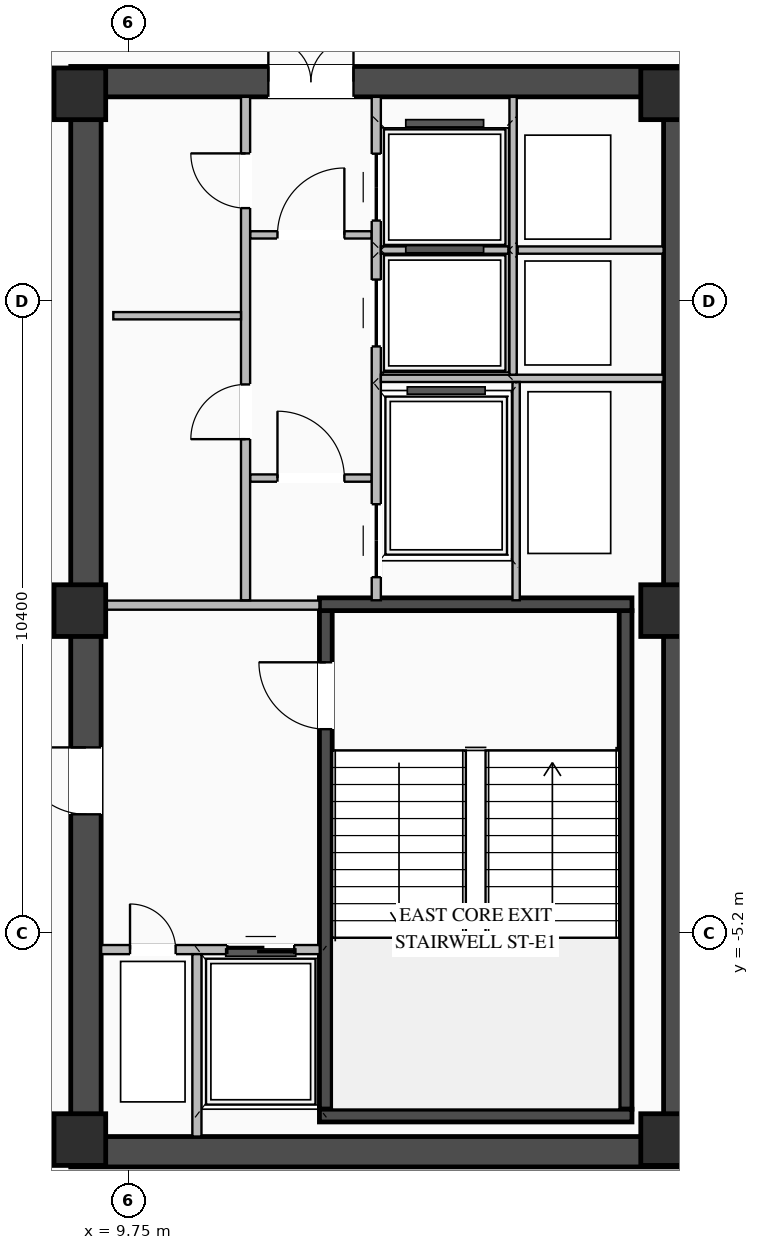
"""IFC4 building model, lengths in metres.
Left out: names, types, materials, properties, quantities, classifications, styles, units other than length and angle.
Written with IfcOpenShell. Run it as: python <this file> out.ifc"""

import sys

from ifc_helpers import new_model, si_unit, direction, frame, frame_2d, origin, origin_2d, place, context, subcontext, project, spatial, rectangle, extrude, element, fill, save


model = new_model("IFC4")
c1 = context("Model", 3, precision=1e-05, world=origin(), true_north=direction((0.0, 1.0)))
c2 = subcontext(c1, "Body", "Model", "MODEL_VIEW")
j1 = project(units=[si_unit("LENGTHUNIT", "METRE"), si_unit("PLANEANGLEUNIT", "RADIAN")], contexts=[c1])
p1 = place(None, origin())
s1 = spatial("IfcSite", under=j1, at=p1, CompositionType="ELEMENT")
p2 = place(p1, origin())
s2 = spatial("IfcBuilding", under=s1, at=p2, CompositionType="ELEMENT")
p3 = place(p2, frame((0.0, 0.0, 247.5)))
s3 = spatial("IfcBuildingStorey", under=s2, at=p3, CompositionType="ELEMENT", Elevation=247.5)
p4 = place(p3, frame((8.8, -8.8, 0.0), z_axis=(0.0, 0.0, 1.0), x_axis=(1.0, 0.0, 0.0)))
e1 = element("IfcWall", 1, at=p4, inside=s3, PredefinedType="SHEAR", context=c2, shape_type="SweptSolid", body=[
    extrude(rectangle(XDim=10.25, YDim=0.5, at=frame_2d((5.125, 0.0))), origin(), (0.0, 0.0, 1.0), 4.02),
])
p5 = place(p3, frame((8.8, 8.8, 0.0), z_axis=(0.0, 0.0, 1.0), x_axis=(1.0, 0.0, 0.0)))
e2 = element("IfcWall", 2, at=p5, inside=s3, PredefinedType="SHEAR", context=c2, shape_type="SweptSolid", body=[
    extrude(rectangle(XDim=10.25, YDim=0.5, at=frame_2d((5.125, 0.0))), origin(), (0.0, 0.0, 1.0), 4.02),
])
p6 = place(p5, frame((3.25, 0.0, 0.0)))
e3 = element("IfcOpeningElement", 3, at=p6, cuts=e2, PredefinedType="OPENING", context=c2, shape_type="SweptSolid", body=[
    extrude(rectangle(XDim=1.4, YDim=2.05, at=frame_2d((0.7, 1.025))), frame((0.0, 0.26, 0.0), z_axis=(0.0, -1.0, 0.0), x_axis=(1.0, 0.0, 0.0)), (0.0, 0.0, 1.0), 0.52),
])
p7 = place(p3, frame((9.05, -8.55, 0.0), z_axis=(0.0, 0.0, 1.0), x_axis=(0.0, 1.0, 0.0)))
e4 = element("IfcWall", 4, at=p7, inside=s3, PredefinedType="SHEAR", context=c2, shape_type="SweptSolid", body=[
    extrude(rectangle(XDim=17.1, YDim=0.5, at=frame_2d((8.55, 0.0))), origin(), (0.0, 0.0, 1.0), 4.02),
])
p8 = place(p7, frame((5.3, 0.0, 0.0)))
e5 = element("IfcOpeningElement", 5, at=p8, cuts=e4, PredefinedType="OPENING", context=c2, shape_type="SweptSolid", body=[
    extrude(rectangle(XDim=1.1, YDim=2.08, at=frame_2d((0.55, 1.04))), frame((0.0, 0.26, 0.0), z_axis=(0.0, -1.0, 0.0), x_axis=(1.0, 0.0, 0.0)), (0.0, 0.0, 1.0), 0.52),
])
p9 = place(p3, frame((18.8, -8.55, 0.0), z_axis=(0.0, 0.0, 1.0), x_axis=(0.0, 1.0, 0.0)))
e6 = element("IfcWall", 6, at=p9, inside=s3, PredefinedType="SHEAR", context=c2, shape_type="SweptSolid", body=[
    extrude(rectangle(XDim=17.1, YDim=0.5, at=frame_2d((8.55, 0.0))), origin(), (0.0, 0.0, 1.0), 4.02),
])
p10 = place(p3, frame((12.995, -8.1, 0.0), z_axis=(0.0, 0.0, 1.0), x_axis=(0.0, 1.0, 0.0)))
e7 = element("IfcWall", 7, at=p10, inside=s3, PredefinedType="SHEAR", context=c2, shape_type="SweptSolid", body=[
    extrude(rectangle(XDim=8.2, YDim=0.21, at=frame_2d((4.1, 0.0))), origin(), (0.0, 0.0, 1.0), 4.02),
])
p11 = place(p10, frame((6.25, 0.0, 0.0)))
e8 = element("IfcOpeningElement", 8, at=p11, cuts=e7, PredefinedType="OPENING", context=c2, shape_type="SweptSolid", body=[
    extrude(rectangle(XDim=1.1, YDim=2.15, at=frame_2d((0.55, 1.075))), frame((0.0, 0.115, 0.0), z_axis=(0.0, -1.0, 0.0), x_axis=(1.0, 0.0, 0.0)), (0.0, 0.0, 1.0), 0.23),
])
p12 = place(p3, frame((17.925, -8.1, 0.0), z_axis=(0.0, 0.0, 1.0), x_axis=(0.0, 1.0, 0.0)))
e9 = element("IfcWall", 9, at=p12, inside=s3, PredefinedType="SHEAR", context=c2, shape_type="SweptSolid", body=[
    extrude(rectangle(XDim=8.2, YDim=0.21, at=frame_2d((4.1, 0.0))), origin(), (0.0, 0.0, 1.0), 4.02),
])
for number, where, z_axis, x_axis in (
    (10, (12.89, -8.205, 0.0), (0.0, 0.0, 1.0), (1.0, 0.0, 0.0)),
    (11, (18.03, 0.205, 0.0), (0.0, 0.0, 1.0), (-1.0, 0.0, 0.0)),
):
    element("IfcWall", number, at=place(p3, frame(where, z_axis=z_axis, x_axis=x_axis)), inside=s3, PredefinedType="SHEAR", context=c2, shape_type="SweptSolid", body=[
        extrude(rectangle(XDim=5.14, YDim=0.21, at=frame_2d((2.57, 0.0))), origin(), (0.0, 0.0, 1.0), 4.02),
    ])
for number, where, z_axis, x_axis in (
    (12, (8.95, -8.6, 0.0), (0.0, 0.0, 1.0), (1.0, 0.0, 0.0)),
    (13, (8.95, 0.1, 0.0), (0.0, 0.0, 1.0), (1.0, 0.0, 0.0)),
    (14, (8.95, 8.6, 0.0), (0.0, 0.0, 1.0), (1.0, 0.0, 0.0)),
    (15, (18.6, -8.6, 0.0), (0.0, 0.0, 1.0), (1.0, 0.0, 0.0)),
    (16, (18.6, 0.1, 0.0), (0.0, 0.0, 1.0), (1.0, 0.0, 0.0)),
    (17, (18.6, 8.6, 0.0), (0.0, 0.0, 1.0), (1.0, 0.0, 0.0)),
):
    element("IfcColumn", number, at=place(p3, frame(where, z_axis=z_axis, x_axis=x_axis)), inside=s3, PredefinedType="COLUMN", context=c2, shape_type="SweptSolid", body=[
        extrude(rectangle(XDim=0.85, YDim=0.85, at=origin_2d()), origin(), (0.0, 0.0, 1.0), 4.2),
    ])
p13 = place(p3, frame((9.3, -5.475, 0.0), z_axis=(0.0, 0.0, 1.0), x_axis=(1.0, 0.0, 0.0)))
e18 = element("IfcWall", 18, at=p13, inside=s3, PredefinedType="STANDARD", context=c2, shape_type="SweptSolid", body=[
    extrude(rectangle(XDim=3.595, YDim=0.15, at=frame_2d((1.797, 0.0))), origin(), (0.0, 0.0, 1.0), 4.0),
])
p14 = place(p13, frame((2.075, 0.0, 0.0)))
e19 = element("IfcOpeningElement", 19, at=p14, cuts=e18, PredefinedType="OPENING", context=c2, shape_type="SweptSolid", body=[
    extrude(rectangle(XDim=1.1, YDim=2.15, at=frame_2d((0.55, 1.075))), frame((0.0, 0.085, 0.0), z_axis=(0.0, -1.0, 0.0), x_axis=(1.0, 0.0, 0.0)), (0.0, 0.0, 1.0), 0.17),
])
p15 = place(p13, frame((0.475, 0.0, 0.0)))
e20 = element("IfcOpeningElement", 20, at=p15, cuts=e18, PredefinedType="OPENING", context=c2, shape_type="SweptSolid", body=[
    extrude(rectangle(XDim=0.75, YDim=2.05, at=frame_2d((0.375, 1.025))), frame((0.0, 0.085, 0.0), z_axis=(0.0, -1.0, 0.0), x_axis=(1.0, 0.0, 0.0)), (0.0, 0.0, 1.0), 0.17),
])
p16 = place(p3, frame((10.875, -8.55, 0.0), z_axis=(0.0, 0.0, 1.0), x_axis=(0.0, 1.0, 0.0)))
e21 = element("IfcWall", 21, at=p16, inside=s3, PredefinedType="STANDARD", context=c2, shape_type="SweptSolid", body=[
    extrude(rectangle(XDim=3.0, YDim=0.15, at=frame_2d((1.5, 0.0))), origin(), (0.0, 0.0, 1.0), 4.0),
])
p17 = place(p3, frame((9.3, 0.19, 0.0), z_axis=(0.0, 0.0, 1.0), x_axis=(1.0, 0.0, 0.0)))
e22 = element("IfcWall", 22, at=p17, inside=s3, PredefinedType="STANDARD", context=c2, shape_type="SweptSolid", body=[
    extrude(rectangle(XDim=3.59, YDim=0.15, at=frame_2d((1.795, 0.0))), origin(), (0.0, 0.0, 1.0), 3.395),
])
p18 = place(p3, frame((11.75, 2.28, 0.0), z_axis=(0.0, 0.0, 1.0), x_axis=(1.0, 0.0, 0.0)))
e23 = element("IfcWall", 23, at=p18, inside=s3, PredefinedType="STANDARD", context=c2, shape_type="SweptSolid", body=[
    extrude(rectangle(XDim=2.0, YDim=0.12, at=frame_2d((1.0, 0.0))), origin(), (0.0, 0.0, 1.0), 4.0),
])
p19 = place(p18, frame((0.45, 0.0, 0.0)))
e24 = element("IfcOpeningElement", 24, at=p19, cuts=e23, PredefinedType="OPENING", context=c2, shape_type="SweptSolid", body=[
    extrude(rectangle(XDim=1.1, YDim=2.1, at=frame_2d((0.55, 1.05))), frame((0.0, 0.07, 0.0), z_axis=(0.0, -1.0, 0.0), x_axis=(1.0, 0.0, 0.0)), (0.0, 0.0, 1.0), 0.14),
])
p20 = place(p3, frame((11.75, 6.28, 0.0), z_axis=(0.0, 0.0, 1.0), x_axis=(1.0, 0.0, 0.0)))
e25 = element("IfcWall", 25, at=p20, inside=s3, PredefinedType="STANDARD", context=c2, shape_type="SweptSolid", body=[
    extrude(rectangle(XDim=2.0, YDim=0.12, at=frame_2d((1.0, 0.0))), origin(), (0.0, 0.0, 1.0), 4.0),
])
p21 = place(p20, frame((0.45, 0.0, 0.0)))
e26 = element("IfcOpeningElement", 26, at=p21, cuts=e25, PredefinedType="OPENING", context=c2, shape_type="SweptSolid", body=[
    extrude(rectangle(XDim=1.1, YDim=2.1, at=frame_2d((0.55, 1.05))), frame((0.0, 0.07, 0.0), z_axis=(0.0, -1.0, 0.0), x_axis=(1.0, 0.0, 0.0)), (0.0, 0.0, 1.0), 0.14),
])
p22 = place(p3, frame((11.675, 0.27, 0.0), z_axis=(0.0, 0.0, 1.0), x_axis=(0.0, 1.0, 0.0)))
e27 = element("IfcWall", 27, at=p22, inside=s3, PredefinedType="STANDARD", context=c2, shape_type="SweptSolid", body=[
    extrude(rectangle(XDim=8.28, YDim=0.15, at=frame_2d((4.14, 0.0))), origin(), (0.0, 0.0, 1.0), 4.0),
])
p23 = place(p22, frame((2.65, 0.0, 0.0)))
e28 = element("IfcOpeningElement", 28, at=p23, cuts=e27, PredefinedType="OPENING", context=c2, shape_type="SweptSolid", body=[
    extrude(rectangle(XDim=0.9, YDim=2.05, at=frame_2d((0.45, 1.025))), frame((0.0, 0.085, 0.0), z_axis=(0.0, -1.0, 0.0), x_axis=(1.0, 0.0, 0.0)), (0.0, 0.0, 1.0), 0.17),
])
p24 = place(p22, frame((6.45, 0.0, 0.0)))
e29 = element("IfcOpeningElement", 29, at=p24, cuts=e27, PredefinedType="OPENING", context=c2, shape_type="SweptSolid", body=[
    extrude(rectangle(XDim=0.9, YDim=2.05, at=frame_2d((0.45, 1.025))), frame((0.0, 0.085, 0.0), z_axis=(0.0, -1.0, 0.0), x_axis=(1.0, 0.0, 0.0)), (0.0, 0.0, 1.0), 0.17),
])
p25 = place(p3, frame((9.5, 4.95, 0.0), z_axis=(0.0, 0.0, 1.0), x_axis=(1.0, 0.0, 0.0)))
e30 = element("IfcWall", 30, at=p25, inside=s3, PredefinedType="STANDARD", context=c2, shape_type="SweptSolid", body=[
    extrude(rectangle(XDim=2.1, YDim=0.12, at=frame_2d((1.05, 0.0))), origin(), (0.0, 0.0, 1.0), 4.0),
])
p26 = place(p3, frame((13.825, 0.27, 0.0), z_axis=(0.0, 0.0, 1.0), x_axis=(0.0, 1.0, 0.0)))
e31 = element("IfcWall", 31, at=p26, inside=s3, PredefinedType="STANDARD", context=c2, shape_type="SweptSolid", body=[
    extrude(rectangle(XDim=8.28, YDim=0.15, at=frame_2d((4.14, 0.0))), origin(), (0.0, 0.0, 1.0), 4.0),
])
p27 = place(p26, frame((4.175, 0.0, 0.0)))
e32 = element("IfcOpeningElement", 32, at=p27, cuts=e31, PredefinedType="OPENING", context=c2, shape_type="SweptSolid", body=[
    extrude(rectangle(XDim=1.1, YDim=2.1, at=frame_2d((0.55, 1.05))), frame((0.0, 0.085, 0.0), z_axis=(0.0, -1.0, 0.0), x_axis=(1.0, 0.0, 0.0)), (0.0, 0.0, 1.0), 0.17),
])
p28 = place(p26, frame((6.245, 0.0, 0.0)))
e33 = element("IfcOpeningElement", 33, at=p28, cuts=e31, PredefinedType="OPENING", context=c2, shape_type="SweptSolid", body=[
    extrude(rectangle(XDim=1.1, YDim=2.1, at=frame_2d((0.55, 1.05))), frame((0.0, 0.085, 0.0), z_axis=(0.0, -1.0, 0.0), x_axis=(1.0, 0.0, 0.0)), (0.0, 0.0, 1.0), 0.17),
])
p29 = place(p26, frame((0.38, 0.0, 0.0)))
e34 = element("IfcOpeningElement", 34, at=p29, cuts=e31, PredefinedType="OPENING", context=c2, shape_type="SweptSolid", body=[
    extrude(rectangle(XDim=1.2, YDim=2.1, at=frame_2d((0.6, 1.05))), frame((0.0, 0.085, 0.0), z_axis=(0.0, -1.0, 0.0), x_axis=(1.0, 0.0, 0.0)), (0.0, 0.0, 1.0), 0.17),
])
p30 = place(p3, frame((13.9, 3.92, 0.0), z_axis=(0.0, 0.0, 1.0), x_axis=(1.0, 0.0, 0.0)))
e35 = element("IfcWall", 35, at=p30, inside=s3, PredefinedType="STANDARD", context=c2, shape_type="SweptSolid", body=[
    extrude(rectangle(XDim=4.65, YDim=0.12, at=frame_2d((2.325, 0.0))), origin(), (0.0, 0.0, 1.0), 4.0),
])
p31 = place(p3, frame((16.15, 6.03, 0.0), z_axis=(0.0, 0.0, 1.0), x_axis=(1.0, 0.0, 0.0)))
e36 = element("IfcWall", 36, at=p31, inside=s3, PredefinedType="STANDARD", context=c2, shape_type="SweptSolid", body=[
    extrude(rectangle(XDim=2.4, YDim=0.12, at=frame_2d((1.2, 0.0))), origin(), (0.0, 0.0, 1.0), 4.0),
])
p32 = place(p3, frame((16.075, 3.98, 0.0), z_axis=(0.0, 0.0, 1.0), x_axis=(0.0, 1.0, 0.0)))
e37 = element("IfcWall", 37, at=p32, inside=s3, PredefinedType="STANDARD", context=c2, shape_type="SweptSolid", body=[
    extrude(rectangle(XDim=4.57, YDim=0.12, at=frame_2d((2.285, 0.0))), origin(), (0.0, 0.0, 1.0), 4.0),
])
p33 = place(p3, frame((13.9, 6.03, 0.0), z_axis=(0.0, 0.0, 1.0), x_axis=(1.0, 0.0, 0.0)))
e38 = element("IfcWall", 38, at=p33, inside=s3, PredefinedType="STANDARD", context=c2, shape_type="SweptSolid", body=[
    extrude(rectangle(XDim=2.1, YDim=0.12, at=frame_2d((1.05, 0.0))), origin(), (0.0, 0.0, 1.0), 4.0),
])
p34 = place(p3, frame((16.125, 0.27, 0.0), z_axis=(0.0, 0.0, 1.0), x_axis=(0.0, 1.0, 0.0)))
e39 = element("IfcWall", 39, at=p34, inside=s3, PredefinedType="STANDARD", context=c2, shape_type="SweptSolid", body=[
    extrude(rectangle(XDim=3.59, YDim=0.12, at=frame_2d((1.795, 0.0))), origin(), (0.0, 0.0, 1.0), 4.0),
])
p35 = place(p11, origin())
e40 = element("IfcDoor", 40, at=p35, inside=s3, OperationType="SINGLE_SWING_RIGHT", PredefinedType="DOOR", context=c2, shape_type="SweptSolid", body=[
    extrude(rectangle(XDim=1.1, YDim=2.15, at=frame_2d((0.55, 1.075))), frame((0.0, 0.025, 0.0), z_axis=(0.0, -1.0, 0.0), x_axis=(1.0, 0.0, 0.0)), (0.0, 0.0, 1.0), 0.05),
])
fill(e8, e40)
p36 = place(p14, origin())
e41 = element("IfcDoor", 41, at=p36, inside=s3, OperationType="DOUBLE_DOOR_SLIDING", PredefinedType="DOOR", context=c2, shape_type="SweptSolid", body=[
    extrude(rectangle(XDim=1.1, YDim=2.15, at=frame_2d((0.55, 1.075))), frame((0.0, 0.025, 0.0), z_axis=(0.0, -1.0, 0.0), x_axis=(1.0, 0.0, 0.0)), (0.0, 0.0, 1.0), 0.05),
])
fill(e19, e41)
p37 = place(p15, origin())
e42 = element("IfcDoor", 42, at=p37, inside=s3, OperationType="SINGLE_SWING_LEFT", PredefinedType="DOOR", context=c2, shape_type="SweptSolid", body=[
    extrude(rectangle(XDim=0.75, YDim=2.05, at=frame_2d((0.375, 1.025))), frame((0.0, 0.025, 0.0), z_axis=(0.0, -1.0, 0.0), x_axis=(1.0, 0.0, 0.0)), (0.0, 0.0, 1.0), 0.05),
])
fill(e20, e42)
p38 = place(p8, origin())
e43 = element("IfcDoor", 43, at=p38, inside=s3, OperationType="SINGLE_SWING_RIGHT", PredefinedType="DOOR", context=c2, shape_type="SweptSolid", body=[
    extrude(rectangle(XDim=1.1, YDim=2.08, at=frame_2d((0.55, 1.04))), frame((0.0, -0.155, 0.0), z_axis=(0.0, -1.0, 0.0), x_axis=(1.0, 0.0, 0.0)), (0.0, 0.0, 1.0), 0.05),
])
fill(e5, e43)
p39 = place(p19, origin())
e44 = element("IfcDoor", 44, at=p39, inside=s3, OperationType="SINGLE_SWING_LEFT", PredefinedType="DOOR", context=c2, shape_type="SweptSolid", body=[
    extrude(rectangle(XDim=1.1, YDim=2.1, at=frame_2d((0.55, 1.05))), frame((0.0, 0.025, 0.0), z_axis=(0.0, -1.0, 0.0), x_axis=(1.0, 0.0, 0.0)), (0.0, 0.0, 1.0), 0.05),
])
fill(e24, e44)
p40 = place(p21, origin())
e45 = element("IfcDoor", 45, at=p40, inside=s3, OperationType="SINGLE_SWING_RIGHT", PredefinedType="DOOR", context=c2, shape_type="SweptSolid", body=[
    extrude(rectangle(XDim=1.1, YDim=2.1, at=frame_2d((0.55, 1.05))), frame((0.0, 0.025, 0.0), z_axis=(0.0, -1.0, 0.0), x_axis=(1.0, 0.0, 0.0)), (0.0, 0.0, 1.0), 0.05),
])
fill(e26, e45)
p41 = place(p6, origin())
e46 = element("IfcDoor", 46, at=p41, inside=s3, OperationType="DOUBLE_DOOR_SINGLE_SWING", PredefinedType="DOOR", context=c2, shape_type="SweptSolid", body=[
    extrude(rectangle(XDim=1.4, YDim=2.05, at=frame_2d((0.7, 1.025))), frame((0.0, 0.195, 0.0), z_axis=(0.0, -1.0, 0.0), x_axis=(1.0, 0.0, 0.0)), (0.0, 0.0, 1.0), 0.05),
])
fill(e3, e46)
p42 = place(p23, origin())
e47 = element("IfcDoor", 47, at=p42, inside=s3, OperationType="SINGLE_SWING_LEFT", PredefinedType="DOOR", context=c2, shape_type="SweptSolid", body=[
    extrude(rectangle(XDim=0.9, YDim=2.05, at=frame_2d((0.45, 1.025))), frame((0.0, 0.025, 0.0), z_axis=(0.0, -1.0, 0.0), x_axis=(1.0, 0.0, 0.0)), (0.0, 0.0, 1.0), 0.05),
])
fill(e28, e47)
p43 = place(p24, origin())
e48 = element("IfcDoor", 48, at=p43, inside=s3, OperationType="SINGLE_SWING_RIGHT", PredefinedType="DOOR", context=c2, shape_type="SweptSolid", body=[
    extrude(rectangle(XDim=0.9, YDim=2.05, at=frame_2d((0.45, 1.025))), frame((0.0, 0.025, 0.0), z_axis=(0.0, -1.0, 0.0), x_axis=(1.0, 0.0, 0.0)), (0.0, 0.0, 1.0), 0.05),
])
fill(e29, e48)
p44 = place(p27, origin())
e49 = element("IfcDoor", 49, at=p44, inside=s3, OperationType="DOUBLE_DOOR_SLIDING", PredefinedType="DOOR", context=c2, shape_type="SweptSolid", body=[
    extrude(rectangle(XDim=1.1, YDim=2.1, at=frame_2d((0.55, 1.05))), frame((0.0, 0.025, 0.0), z_axis=(0.0, -1.0, 0.0), x_axis=(1.0, 0.0, 0.0)), (0.0, 0.0, 1.0), 0.05),
])
fill(e32, e49)
p45 = place(p28, origin())
e50 = element("IfcDoor", 50, at=p45, inside=s3, OperationType="DOUBLE_DOOR_SLIDING", PredefinedType="DOOR", context=c2, shape_type="SweptSolid", body=[
    extrude(rectangle(XDim=1.1, YDim=2.1, at=frame_2d((0.55, 1.05))), frame((0.0, 0.025, 0.0), z_axis=(0.0, -1.0, 0.0), x_axis=(1.0, 0.0, 0.0)), (0.0, 0.0, 1.0), 0.05),
])
fill(e33, e50)
p46 = place(p29, origin())
e51 = element("IfcDoor", 51, at=p46, inside=s3, OperationType="DOUBLE_DOOR_SLIDING", PredefinedType="DOOR", context=c2, shape_type="SweptSolid", body=[
    extrude(rectangle(XDim=1.2, YDim=2.1, at=frame_2d((0.6, 1.05))), frame((0.0, 0.025, 0.0), z_axis=(0.0, -1.0, 0.0), x_axis=(1.0, 0.0, 0.0)), (0.0, 0.0, 1.0), 0.05),
])
fill(e34, e51)
save(model, sys.argv[1])
